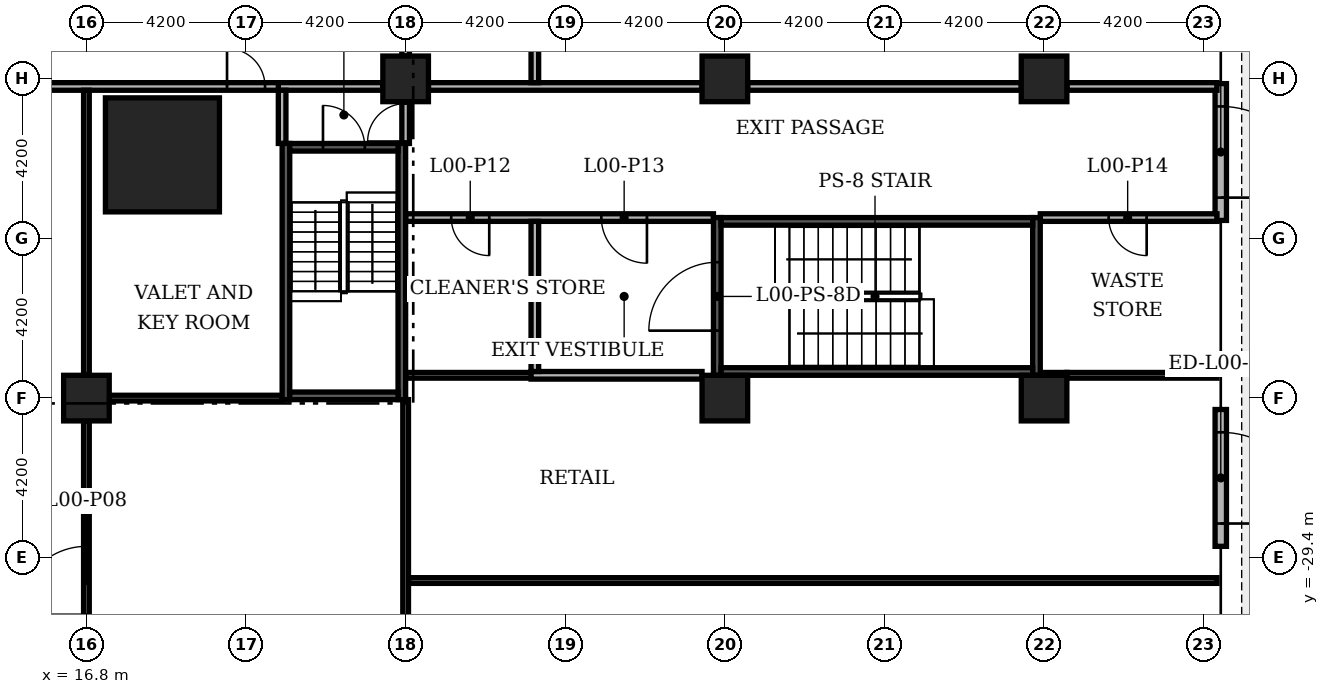
"""IFC4 building model, lengths in metres.
Left out: names, types, materials, properties, quantities, classifications, styles, units other than length and angle.
Written with IfcOpenShell. Run it as: python <this file> out.ifc"""

import sys

from ifc_helpers import new_model, si_unit, direction, frame, frame_2d, origin, origin_2d, place, context, subcontext, project, spatial, rectangle, extrude, element, fill, save


model = new_model("IFC4")
c1 = context("Model", 3, precision=1e-05, world=origin(), true_north=direction((0.0, 1.0)))
c2 = subcontext(c1, "Body", "Model", "MODEL_VIEW")
j1 = project(units=[si_unit("LENGTHUNIT", "METRE"), si_unit("PLANEANGLEUNIT", "RADIAN")], contexts=[c1])
p1 = place(None, origin())
s1 = spatial("IfcSite", under=j1, at=p1, CompositionType="ELEMENT")
p2 = place(p1, origin())
s2 = spatial("IfcBuilding", under=s1, at=p2, CompositionType="ELEMENT")
p3 = place(p2, origin())
s3 = spatial("IfcBuildingStorey", under=s2, at=p3, CompositionType="ELEMENT", Elevation=0.0)
p4 = place(p3, frame((18.8, -18.8, 0.0), z_axis=(0.0, 0.0, 1.0), x_axis=(1.0, 0.0, 0.0)))
e1 = element("IfcColumn", 1, at=p4, inside=s3, PredefinedType="COLUMN", context=c2, shape_type="SweptSolid", body=[
    extrude(rectangle(XDim=3.0, YDim=3.0, at=origin_2d()), origin(), (0.0, 0.0, 1.0), 7.2),
])
for number, where, z_axis, x_axis in (
    (2, (25.2, -16.8, 0.0), (0.0, 0.0, 1.0), (1.0, 0.0, 0.0)),
    (3, (16.8, -25.2, 0.0), (0.0, 0.0, 1.0), (1.0, 0.0, 0.0)),
    (4, (33.6, -16.8, 0.0), (0.0, 0.0, 1.0), (1.0, 0.0, 0.0)),
    (5, (33.6, -25.2, 0.0), (0.0, 0.0, 1.0), (1.0, 0.0, 0.0)),
    (6, (42.0, -16.8, 0.0), (0.0, 0.0, 1.0), (1.0, 0.0, 0.0)),
    (7, (42.0, -25.2, 0.0), (0.0, 0.0, 1.0), (1.0, 0.0, 0.0)),
):
    element("IfcColumn", number, at=place(p3, frame(where, z_axis=z_axis, x_axis=x_axis)), inside=s3, PredefinedType="COLUMN", context=c2, shape_type="SweptSolid", body=[
        extrude(rectangle(XDim=1.2, YDim=1.2, at=origin_2d()), origin(), (0.0, 0.0, 1.0), 7.2),
    ])
p5 = place(p3, frame((46.65, -29.1, 0.0), z_axis=(0.0, 0.0, 1.0), x_axis=(0.0, 1.0, 0.0)))
e8 = element("IfcWall", 8, at=p5, inside=s3, PredefinedType="STANDARD", context=c2, shape_type="SweptSolid", body=[
    extrude(rectangle(XDim=3.6, YDim=0.3, at=frame_2d((1.8, 0.0))), origin(), (0.0, 0.0, 1.0), 6.78),
])
p6 = place(p5, frame((0.6, 0.0, 0.0)))
e9 = element("IfcOpeningElement", 9, at=p6, cuts=e8, PredefinedType="OPENING", context=c2, shape_type="SweptSolid", body=[
    extrude(rectangle(XDim=2.4, YDim=2.4, at=frame_2d((1.2, 1.2))), frame((0.0, 0.16, 0.0), z_axis=(0.0, -1.0, 0.0), x_axis=(1.0, 0.0, 0.0)), (0.0, 0.0, 1.0), 0.32),
])
p7 = place(p3, frame((46.65, -20.525, 0.0), z_axis=(0.0, 0.0, 1.0), x_axis=(0.0, 1.0, 0.0)))
e10 = element("IfcWall", 10, at=p7, inside=s3, PredefinedType="STANDARD", context=c2, shape_type="SweptSolid", body=[
    extrude(rectangle(XDim=3.6, YDim=0.3, at=frame_2d((1.8, 0.0))), origin(), (0.0, 0.0, 1.0), 6.78),
])
p8 = place(p7, frame((0.6, 0.0, 0.0)))
e11 = element("IfcOpeningElement", 11, at=p8, cuts=e10, PredefinedType="OPENING", context=c2, shape_type="SweptSolid", body=[
    extrude(rectangle(XDim=2.4, YDim=2.4, at=frame_2d((1.2, 1.2))), frame((0.0, 0.16, 0.0), z_axis=(0.0, -1.0, 0.0), x_axis=(1.0, 0.0, 0.0)), (0.0, 0.0, 1.0), 0.32),
])
p9 = place(p3, frame((25.275, -30.0, 0.0), z_axis=(0.0, 0.0, 1.0), x_axis=(1.0, 0.0, 0.0)))
e12 = element("IfcWall", 12, at=p9, inside=s3, PredefinedType="PARTITIONING", context=c2, shape_type="SweptSolid", body=[
    extrude(rectangle(XDim=21.275, YDim=0.15, at=frame_2d((10.638, 0.0))), origin(), (0.0, 0.0, 1.0), 6.38),
])
p10 = place(p3, frame((17.4, -25.2, 0.0), z_axis=(0.0, 0.0, 1.0), x_axis=(1.0, 0.0, 0.0)))
e13 = element("IfcWall", 13, at=p10, inside=s3, PredefinedType="PARTITIONING", context=c2, shape_type="SweptSolid", body=[
    extrude(rectangle(XDim=4.55, YDim=0.15, at=frame_2d((2.275, 0.0))), origin(), (0.0, 0.0, 1.0), 6.48),
])
p11 = place(p3, frame((25.2, -24.6, 0.0), z_axis=(0.0, 0.0, 1.0), x_axis=(1.0, 0.0, 0.0)))
e14 = element("IfcWall", 14, at=p11, inside=s3, PredefinedType="PARTITIONING", context=c2, shape_type="SweptSolid", body=[
    extrude(rectangle(XDim=3.5, YDim=0.15, at=frame_2d((1.75, 0.0))), origin(), (0.0, 0.0, 1.0), 6.78),
])
p12 = place(p3, frame((28.5, -24.6, 0.0), z_axis=(0.0, 0.0, 1.0), x_axis=(1.0, 0.0, 0.0)))
e15 = element("IfcWall", 15, at=p12, inside=s3, PredefinedType="PARTITIONING", context=c2, shape_type="SweptSolid", body=[
    extrude(rectangle(XDim=4.5, YDim=0.2, at=frame_2d((2.25, 0.0))), origin(), (0.0, 0.0, 1.0), 6.78),
])
p13 = place(p3, frame((41.9, -24.6, 0.0), z_axis=(0.0, 0.0, 1.0), x_axis=(1.0, 0.0, 0.0)))
e16 = element("IfcWall", 16, at=p13, inside=s3, PredefinedType="PARTITIONING", context=c2, shape_type="SweptSolid", body=[
    extrude(rectangle(XDim=0.7, YDim=0.15, at=frame_2d((0.35, 0.0))), origin(), (0.0, 0.0, 1.0), 6.78),
])
p14 = place(p3, frame((42.6, -24.6, 0.0), z_axis=(0.0, 0.0, 1.0), x_axis=(1.0, 0.0, 0.0)))
e17 = element("IfcWall", 17, at=p14, inside=s3, PredefinedType="PARTITIONING", context=c2, shape_type="SweptSolid", body=[
    extrude(rectangle(XDim=3.95, YDim=0.15, at=frame_2d((1.975, 0.0))), origin(), (0.0, 0.0, 1.0), 6.78),
])
p15 = place(p3, frame((25.2, -20.45, 0.0), z_axis=(0.0, 0.0, 1.0), x_axis=(1.0, 0.0, 0.0)))
e18 = element("IfcWall", 18, at=p15, inside=s3, PredefinedType="PARTITIONING", context=c2, shape_type="SweptSolid", body=[
    extrude(rectangle(XDim=8.1, YDim=0.2, at=frame_2d((4.05, 0.0))), origin(), (0.0, 0.0, 1.0), 6.78),
])
p16 = place(p15, frame((1.2, 0.0, 0.0)))
e19 = element("IfcOpeningElement", 19, at=p16, cuts=e18, PredefinedType="OPENING", context=c2, shape_type="SweptSolid", body=[
    extrude(rectangle(XDim=1.0, YDim=2.1, at=frame_2d((0.5, 1.05))), frame((0.0, 0.11, 0.0), z_axis=(0.0, -1.0, 0.0), x_axis=(1.0, 0.0, 0.0)), (0.0, 0.0, 1.0), 0.22),
])
p17 = place(p15, frame((5.15, 0.0, 0.0)))
e20 = element("IfcOpeningElement", 20, at=p17, cuts=e18, PredefinedType="OPENING", context=c2, shape_type="SweptSolid", body=[
    extrude(rectangle(XDim=1.2, YDim=2.2, at=frame_2d((0.6, 1.1))), frame((0.0, 0.11, 0.0), z_axis=(0.0, -1.0, 0.0), x_axis=(1.0, 0.0, 0.0)), (0.0, 0.0, 1.0), 0.22),
])
p18 = place(p3, frame((41.9, -20.45, 0.0), z_axis=(0.0, 0.0, 1.0), x_axis=(1.0, 0.0, 0.0)))
e21 = element("IfcWall", 21, at=p18, inside=s3, PredefinedType="PARTITIONING", context=c2, shape_type="SweptSolid", body=[
    extrude(rectangle(XDim=4.65, YDim=0.2, at=frame_2d((2.325, 0.0))), origin(), (0.0, 0.0, 1.0), 6.38),
])
p19 = place(p18, frame((1.8, 0.0, 0.0)))
e22 = element("IfcOpeningElement", 22, at=p19, cuts=e21, PredefinedType="OPENING", context=c2, shape_type="SweptSolid", body=[
    extrude(rectangle(XDim=1.0, YDim=2.1, at=frame_2d((0.5, 1.05))), frame((0.0, 0.11, 0.0), z_axis=(0.0, -1.0, 0.0), x_axis=(1.0, 0.0, 0.0)), (0.0, 0.0, 1.0), 0.22),
])
p20 = place(p3, frame((-22.05, -17.0, 0.0), z_axis=(0.0, 0.0, 1.0), x_axis=(1.0, 0.0, 0.0)))
e23 = element("IfcWall", 23, at=p20, inside=s3, PredefinedType="PARTITIONING", context=c2, shape_type="SweptSolid", body=[
    extrude(rectangle(XDim=44.1, YDim=0.2, at=frame_2d((22.05, 0.0))), origin(), (0.0, 0.0, 1.0), 6.78),
])
p21 = place(p20, frame((0.55, 0.0, 0.0)))
e24 = element("IfcOpeningElement", 24, at=p21, cuts=e23, PredefinedType="OPENING", context=c2, shape_type="SweptSolid", body=[
    extrude(rectangle(XDim=1.0, YDim=2.1, at=frame_2d((0.5, 1.05))), frame((0.0, 0.11, 0.0), z_axis=(0.0, -1.0, 0.0), x_axis=(1.0, 0.0, 0.0)), (0.0, 0.0, 1.0), 0.22),
])
p22 = place(p20, frame((12.85, 0.0, 0.0)))
e25 = element("IfcOpeningElement", 25, at=p22, cuts=e23, PredefinedType="OPENING", context=c2, shape_type="SweptSolid", body=[
    extrude(rectangle(XDim=2.4, YDim=2.4, at=frame_2d((1.2, 1.2))), frame((0.0, 0.11, 0.0), z_axis=(0.0, -1.0, 0.0), x_axis=(1.0, 0.0, 0.0)), (0.0, 0.0, 1.0), 0.22),
])
p23 = place(p20, frame((28.85, 0.0, 0.0)))
e26 = element("IfcOpeningElement", 26, at=p23, cuts=e23, PredefinedType="OPENING", context=c2, shape_type="SweptSolid", body=[
    extrude(rectangle(XDim=2.4, YDim=2.4, at=frame_2d((1.2, 1.2))), frame((0.0, 0.11, 0.0), z_axis=(0.0, -1.0, 0.0), x_axis=(1.0, 0.0, 0.0)), (0.0, 0.0, 1.0), 0.22),
])
p24 = place(p20, frame((42.55, 0.0, 0.0)))
e27 = element("IfcOpeningElement", 27, at=p24, cuts=e23, PredefinedType="OPENING", context=c2, shape_type="SweptSolid", body=[
    extrude(rectangle(XDim=1.0, YDim=2.1, at=frame_2d((0.5, 1.05))), frame((0.0, 0.11, 0.0), z_axis=(0.0, -1.0, 0.0), x_axis=(1.0, 0.0, 0.0)), (0.0, 0.0, 1.0), 0.22),
])
p25 = place(p3, frame((21.85, -17.0, 0.0), z_axis=(0.0, 0.0, 1.0), x_axis=(1.0, 0.0, 0.0)))
e28 = element("IfcWall", 28, at=p25, inside=s3, PredefinedType="PARTITIONING", context=c2, shape_type="SweptSolid", body=[
    extrude(rectangle(XDim=2.75, YDim=0.2, at=frame_2d((1.375, 0.0))), origin(), (0.0, 0.0, 1.0), 6.78),
])
for number, where, z_axis, x_axis in (
    (29, (25.8, -17.0, 0.0), (0.0, 0.0, 1.0), (1.0, 0.0, 0.0)),
    (30, (34.2, -17.0, 0.0), (0.0, 0.0, 1.0), (1.0, 0.0, 0.0)),
):
    element("IfcWall", number, at=place(p3, frame(where, z_axis=z_axis, x_axis=x_axis)), inside=s3, PredefinedType="PARTITIONING", context=c2, shape_type="SweptSolid", body=[
        extrude(rectangle(XDim=7.2, YDim=0.2, at=frame_2d((3.6, 0.0))), origin(), (0.0, 0.0, 1.0), 6.48),
    ])
p26 = place(p3, frame((42.6, -17.0, 0.0), z_axis=(0.0, 0.0, 1.0), x_axis=(1.0, 0.0, 0.0)))
e31 = element("IfcWall", 31, at=p26, inside=s3, PredefinedType="PARTITIONING", context=c2, shape_type="SweptSolid", body=[
    extrude(rectangle(XDim=3.95, YDim=0.2, at=frame_2d((1.975, 0.0))), origin(), (0.0, 0.0, 1.0), 6.48),
])
p27 = place(p3, frame((16.8, -33.0, 0.0), z_axis=(0.0, 0.0, 1.0), x_axis=(0.0, 1.0, 0.0)))
e32 = element("IfcWall", 32, at=p27, inside=s3, PredefinedType="PARTITIONING", context=c2, shape_type="SweptSolid", body=[
    extrude(rectangle(XDim=7.2, YDim=0.15, at=frame_2d((3.6, 0.0))), origin(), (0.0, 0.0, 1.0), 6.38),
])
p28 = place(p27, frame((2.1, 0.0, 0.0)))
e33 = element("IfcOpeningElement", 33, at=p28, cuts=e32, PredefinedType="OPENING", context=c2, shape_type="SweptSolid", body=[
    extrude(rectangle(XDim=1.8, YDim=2.2, at=frame_2d((0.9, 1.1))), frame((0.0, 0.085, 0.0), z_axis=(0.0, -1.0, 0.0), x_axis=(1.0, 0.0, 0.0)), (0.0, 0.0, 1.0), 0.17),
])
p29 = place(p3, frame((16.8, -24.6, 0.0), z_axis=(0.0, 0.0, 1.0), x_axis=(0.0, 1.0, 0.0)))
e34 = element("IfcWall", 34, at=p29, inside=s3, PredefinedType="PARTITIONING", context=c2, shape_type="SweptSolid", body=[
    extrude(rectangle(XDim=7.5, YDim=0.15, at=frame_2d((3.75, 0.0))), origin(), (0.0, 0.0, 1.0), 6.78),
])
p30 = place(p3, frame((21.95, -18.5, 0.0), z_axis=(0.0, 0.0, 1.0), x_axis=(0.0, 1.0, 0.0)))
e35 = element("IfcWall", 35, at=p30, inside=s3, PredefinedType="PARTITIONING", context=c2, shape_type="SweptSolid", body=[
    extrude(rectangle(XDim=1.4, YDim=0.2, at=frame_2d((0.7, 0.0))), origin(), (0.0, 0.0, 1.0), 6.78),
])
p31 = place(p3, frame((25.2, -33.0, 0.0), z_axis=(0.0, 0.0, 1.0), x_axis=(0.0, 1.0, 0.0)))
e36 = element("IfcWall", 36, at=p31, inside=s3, PredefinedType="PARTITIONING", context=c2, shape_type="SweptSolid", body=[
    extrude(rectangle(XDim=7.76, YDim=0.15, at=frame_2d((3.88, 0.0))), origin(), (0.0, 0.0, 1.0), 6.38),
])
p32 = place(p3, frame((25.2, -18.5, 0.0), z_axis=(0.0, 0.0, 1.0), x_axis=(0.0, 1.0, 0.0)))
e37 = element("IfcWall", 37, at=p32, inside=s3, PredefinedType="PARTITIONING", context=c2, shape_type="SweptSolid", body=[
    extrude(rectangle(XDim=1.1, YDim=0.2, at=frame_2d((0.55, 0.0))), origin(), (0.0, 0.0, 1.0), 6.38),
])
p33 = place(p32, frame((0.05, 0.0, 0.0)))
e38 = element("IfcOpeningElement", 38, at=p33, cuts=e37, PredefinedType="OPENING", context=c2, shape_type="SweptSolid", body=[
    extrude(rectangle(XDim=1.0, YDim=2.2, at=frame_2d((0.5, 1.1))), frame((0.0, 0.11, 0.0), z_axis=(0.0, -1.0, 0.0), x_axis=(1.0, 0.0, 0.0)), (0.0, 0.0, 1.0), 0.22),
])
p34 = place(p3, frame((25.2, -16.2, 0.0), z_axis=(0.0, 0.0, 1.0), x_axis=(0.0, 1.0, 0.0)))
e39 = element("IfcWall", 39, at=p34, inside=s3, PredefinedType="PARTITIONING", context=c2, shape_type="SweptSolid", body=[
    extrude(rectangle(XDim=7.2, YDim=0.2, at=frame_2d((3.6, 0.0))), origin(), (0.0, 0.0, 1.0), 6.48),
])
p35 = place(p34, frame((1.5, 0.0, 0.0)))
e40 = element("IfcOpeningElement", 40, at=p35, cuts=e39, PredefinedType="OPENING", context=c2, shape_type="SweptSolid", body=[
    extrude(rectangle(XDim=1.8, YDim=2.2, at=frame_2d((0.9, 1.1))), frame((0.0, 0.11, 0.0), z_axis=(0.0, -1.0, 0.0), x_axis=(1.0, 0.0, 0.0)), (0.0, 0.0, 1.0), 0.22),
])
p36 = place(p3, frame((28.6, -24.5, 0.0), z_axis=(0.0, 0.0, 1.0), x_axis=(0.0, 1.0, 0.0)))
e41 = element("IfcWall", 41, at=p36, inside=s3, PredefinedType="PARTITIONING", context=c2, shape_type="SweptSolid", body=[
    extrude(rectangle(XDim=3.95, YDim=0.2, at=frame_2d((1.975, 0.0))), origin(), (0.0, 0.0, 1.0), 6.78),
])
p37 = place(p3, frame((28.6, -16.9, 0.0), z_axis=(0.0, 0.0, 1.0), x_axis=(0.0, 1.0, 0.0)))
e42 = element("IfcWall", 42, at=p37, inside=s3, PredefinedType="PARTITIONING", context=c2, shape_type="SweptSolid", body=[
    extrude(rectangle(XDim=33.8, YDim=0.2, at=frame_2d((16.9, 0.0))), origin(), (0.0, 0.0, 1.0), 6.48),
])
p38 = place(p37, frame((3.6, 0.0, 0.0)))
e43 = element("IfcOpeningElement", 43, at=p38, cuts=e42, PredefinedType="OPENING", context=c2, shape_type="SweptSolid", body=[
    extrude(rectangle(XDim=1.2, YDim=2.2, at=frame_2d((0.6, 1.1))), frame((0.0, 0.11, 0.0), z_axis=(0.0, -1.0, 0.0), x_axis=(1.0, 0.0, 0.0)), (0.0, 0.0, 1.0), 0.22),
])
p39 = place(p37, frame((12.1, 0.0, 0.0)))
e44 = element("IfcOpeningElement", 44, at=p39, cuts=e42, PredefinedType="OPENING", context=c2, shape_type="SweptSolid", body=[
    extrude(rectangle(XDim=1.2, YDim=2.2, at=frame_2d((0.6, 1.1))), frame((0.0, 0.11, 0.0), z_axis=(0.0, -1.0, 0.0), x_axis=(1.0, 0.0, 0.0)), (0.0, 0.0, 1.0), 0.22),
])
p40 = place(p37, frame((20.5, 0.0, 0.0)))
e45 = element("IfcOpeningElement", 45, at=p40, cuts=e42, PredefinedType="OPENING", context=c2, shape_type="SweptSolid", body=[
    extrude(rectangle(XDim=1.2, YDim=2.2, at=frame_2d((0.6, 1.1))), frame((0.0, 0.11, 0.0), z_axis=(0.0, -1.0, 0.0), x_axis=(1.0, 0.0, 0.0)), (0.0, 0.0, 1.0), 0.22),
])
p41 = place(p37, frame((29.0, 0.0, 0.0)))
e46 = element("IfcOpeningElement", 46, at=p41, cuts=e42, PredefinedType="OPENING", context=c2, shape_type="SweptSolid", body=[
    extrude(rectangle(XDim=1.2, YDim=2.2, at=frame_2d((0.6, 1.1))), frame((0.0, 0.11, 0.0), z_axis=(0.0, -1.0, 0.0), x_axis=(1.0, 0.0, 0.0)), (0.0, 0.0, 1.0), 0.22),
])
p42 = place(p3, frame((22.05, -25.24, 0.0), z_axis=(0.0, 0.0, 1.0), x_axis=(0.0, 1.0, 0.0)))
e47 = element("IfcWall", 47, at=p42, inside=s3, PredefinedType="SOLIDWALL", context=c2, shape_type="SweptSolid", body=[
    extrude(rectangle(XDim=6.74, YDim=0.2, at=frame_2d((3.37, 0.0))), origin(), (0.0, 0.0, 1.0), 6.78),
])
p43 = place(p3, frame((25.1, -25.24, 0.0), z_axis=(0.0, 0.0, 1.0), x_axis=(0.0, 1.0, 0.0)))
e48 = element("IfcWall", 48, at=p43, inside=s3, PredefinedType="SOLIDWALL", context=c2, shape_type="SweptSolid", body=[
    extrude(rectangle(XDim=6.74, YDim=0.2, at=frame_2d((3.37, 0.0))), origin(), (0.0, 0.0, 1.0), 6.38),
])
p44 = place(p3, frame((22.15, -25.14, 0.0), z_axis=(0.0, 0.0, 1.0), x_axis=(1.0, 0.0, 0.0)))
e49 = element("IfcWall", 49, at=p44, inside=s3, PredefinedType="SOLIDWALL", context=c2, shape_type="SweptSolid", body=[
    extrude(rectangle(XDim=2.85, YDim=0.2, at=frame_2d((1.425, 0.0))), origin(), (0.0, 0.0, 1.0), 6.48),
])
p45 = place(p3, frame((22.15, -18.6, 0.0), z_axis=(0.0, 0.0, 1.0), x_axis=(1.0, 0.0, 0.0)))
e50 = element("IfcWall", 50, at=p45, inside=s3, PredefinedType="SOLIDWALL", context=c2, shape_type="SweptSolid", body=[
    extrude(rectangle(XDim=2.85, YDim=0.2, at=frame_2d((1.425, 0.0))), origin(), (0.0, 0.0, 1.0), 6.78),
])
p46 = place(p45, frame((0.875, 0.0, 0.0)))
e51 = element("IfcOpeningElement", 51, at=p46, cuts=e50, PredefinedType="OPENING", context=c2, shape_type="SweptSolid", body=[
    extrude(rectangle(XDim=1.1, YDim=2.2, at=frame_2d((0.55, 1.1))), frame((0.0, 0.11, 0.0), z_axis=(0.0, -1.0, 0.0), x_axis=(1.0, 0.0, 0.0)), (0.0, 0.0, 1.0), 0.22),
])
p47 = place(p3, frame((33.4, -24.6, 0.0), z_axis=(0.0, 0.0, 1.0), x_axis=(0.0, 1.0, 0.0)))
e52 = element("IfcWall", 52, at=p47, inside=s3, PredefinedType="SOLIDWALL", context=c2, shape_type="SweptSolid", body=[
    extrude(rectangle(XDim=4.15, YDim=0.2, at=frame_2d((2.075, 0.0))), origin(), (0.0, 0.0, 1.0), 6.38),
])
p48 = place(p47, frame((1.175, 0.0, 0.0)))
e53 = element("IfcOpeningElement", 53, at=p48, cuts=e52, PredefinedType="OPENING", context=c2, shape_type="SweptSolid", body=[
    extrude(rectangle(XDim=1.8, YDim=2.2, at=frame_2d((0.9, 1.1))), frame((0.0, 0.11, 0.0), z_axis=(0.0, -1.0, 0.0), x_axis=(1.0, 0.0, 0.0)), (0.0, 0.0, 1.0), 0.22),
])
p49 = place(p3, frame((41.8, -24.6, 0.0), z_axis=(0.0, 0.0, 1.0), x_axis=(0.0, 1.0, 0.0)))
e54 = element("IfcWall", 54, at=p49, inside=s3, PredefinedType="SOLIDWALL", context=c2, shape_type="SweptSolid", body=[
    extrude(rectangle(XDim=4.15, YDim=0.2, at=frame_2d((2.075, 0.0))), origin(), (0.0, 0.0, 1.0), 6.38),
])
for number, where, z_axis, x_axis in (
    (55, (33.5, -24.5, 0.0), (0.0, 0.0, 1.0), (1.0, 0.0, 0.0)),
    (56, (33.5, -20.55, 0.0), (0.0, 0.0, 1.0), (1.0, 0.0, 0.0)),
):
    element("IfcWall", number, at=place(p3, frame(where, z_axis=z_axis, x_axis=x_axis)), inside=s3, PredefinedType="SOLIDWALL", context=c2, shape_type="SweptSolid", body=[
        extrude(rectangle(XDim=8.2, YDim=0.2, at=frame_2d((4.1, 0.0))), origin(), (0.0, 0.0, 1.0), 7.0),
    ])
p50 = place(p6, frame((2.4, 0.0, 0.0), z_axis=(0.0, 0.0, 1.0), x_axis=(-1.0, 0.0, 0.0)))
e57 = element("IfcDoor", 57, at=p50, inside=s3, OperationType="DOUBLE_DOOR_SINGLE_SWING", PredefinedType="DOOR", context=c2, shape_type="SweptSolid", body=[
    extrude(rectangle(XDim=2.4, YDim=2.4, at=frame_2d((1.2, 1.2))), frame((0.0, 0.025, 0.0), z_axis=(0.0, -1.0, 0.0), x_axis=(1.0, 0.0, 0.0)), (0.0, 0.0, 1.0), 0.05),
])
fill(e9, e57)
p51 = place(p8, frame((2.4, 0.0, 0.0), z_axis=(0.0, 0.0, 1.0), x_axis=(-1.0, 0.0, 0.0)))
e58 = element("IfcDoor", 58, at=p51, inside=s3, OperationType="SINGLE_SWING_LEFT", PredefinedType="DOOR", context=c2, shape_type="SweptSolid", body=[
    extrude(rectangle(XDim=2.4, YDim=2.4, at=frame_2d((1.2, 1.2))), frame((0.0, 0.025, 0.0), z_axis=(0.0, -1.0, 0.0), x_axis=(1.0, 0.0, 0.0)), (0.0, 0.0, 1.0), 0.05),
])
fill(e11, e58)
p52 = place(p28, origin())
e59 = element("IfcDoor", 59, at=p52, inside=s3, OperationType="DOUBLE_DOOR_SINGLE_SWING", PredefinedType="DOOR", context=c2, shape_type="SweptSolid", body=[
    extrude(rectangle(XDim=1.8, YDim=2.2, at=frame_2d((0.9, 1.1))), frame((0.0, 0.025, 0.0), z_axis=(0.0, -1.0, 0.0), x_axis=(1.0, 0.0, 0.0)), (0.0, 0.0, 1.0), 0.05),
])
fill(e33, e59)
p53 = place(p16, origin())
e60 = element("IfcDoor", 60, at=p53, inside=s3, OperationType="SINGLE_SWING_RIGHT", PredefinedType="DOOR", context=c2, shape_type="SweptSolid", body=[
    extrude(rectangle(XDim=1.0, YDim=2.1, at=frame_2d((0.5, 1.05))), frame((0.0, 0.025, 0.0), z_axis=(0.0, -1.0, 0.0), x_axis=(1.0, 0.0, 0.0)), (0.0, 0.0, 1.0), 0.05),
])
fill(e19, e60)
p54 = place(p17, origin())
e61 = element("IfcDoor", 61, at=p54, inside=s3, OperationType="SINGLE_SWING_RIGHT", PredefinedType="DOOR", context=c2, shape_type="SweptSolid", body=[
    extrude(rectangle(XDim=1.2, YDim=2.2, at=frame_2d((0.6, 1.1))), frame((0.0, 0.025, 0.0), z_axis=(0.0, -1.0, 0.0), x_axis=(1.0, 0.0, 0.0)), (0.0, 0.0, 1.0), 0.05),
])
fill(e20, e61)
p55 = place(p19, origin())
e62 = element("IfcDoor", 62, at=p55, inside=s3, OperationType="SINGLE_SWING_RIGHT", PredefinedType="DOOR", context=c2, shape_type="SweptSolid", body=[
    extrude(rectangle(XDim=1.0, YDim=2.1, at=frame_2d((0.5, 1.05))), frame((0.0, 0.025, 0.0), z_axis=(0.0, -1.0, 0.0), x_axis=(1.0, 0.0, 0.0)), (0.0, 0.0, 1.0), 0.05),
])
fill(e22, e62)
p56 = place(p33, origin())
e63 = element("IfcDoor", 63, at=p56, inside=s3, OperationType="SINGLE_SWING_LEFT", PredefinedType="DOOR", context=c2, shape_type="SweptSolid", body=[
    extrude(rectangle(XDim=1.0, YDim=2.2, at=frame_2d((0.5, 1.1))), frame((0.0, 0.025, 0.0), z_axis=(0.0, -1.0, 0.0), x_axis=(1.0, 0.0, 0.0)), (0.0, 0.0, 1.0), 0.05),
])
fill(e38, e63)
p57 = place(p24, origin())
e64 = element("IfcDoor", 64, at=p57, inside=s3, OperationType="SINGLE_SWING_LEFT", PredefinedType="DOOR", context=c2, shape_type="SweptSolid", body=[
    extrude(rectangle(XDim=1.0, YDim=2.1, at=frame_2d((0.5, 1.05))), frame((0.0, 0.025, 0.0), z_axis=(0.0, -1.0, 0.0), x_axis=(1.0, 0.0, 0.0)), (0.0, 0.0, 1.0), 0.05),
])
fill(e27, e64)
p58 = place(p46, origin())
e65 = element("IfcDoor", 65, at=p58, inside=s3, OperationType="SINGLE_SWING_LEFT", PredefinedType="DOOR", context=c2, shape_type="SweptSolid", body=[
    extrude(rectangle(XDim=1.1, YDim=2.2, at=frame_2d((0.55, 1.1))), frame((0.0, 0.025, 0.0), z_axis=(0.0, -1.0, 0.0), x_axis=(1.0, 0.0, 0.0)), (0.0, 0.0, 1.0), 0.05),
])
fill(e51, e65)
p59 = place(p48, origin())
e66 = element("IfcDoor", 66, at=p59, inside=s3, OperationType="DOUBLE_DOOR_SINGLE_SWING", PredefinedType="DOOR", context=c2, shape_type="SweptSolid", body=[
    extrude(rectangle(XDim=1.8, YDim=2.2, at=frame_2d((0.9, 1.1))), frame((0.0, 0.025, 0.0), z_axis=(0.0, -1.0, 0.0), x_axis=(1.0, 0.0, 0.0)), (0.0, 0.0, 1.0), 0.05),
])
fill(e53, e66)
save(model, sys.argv[1])
